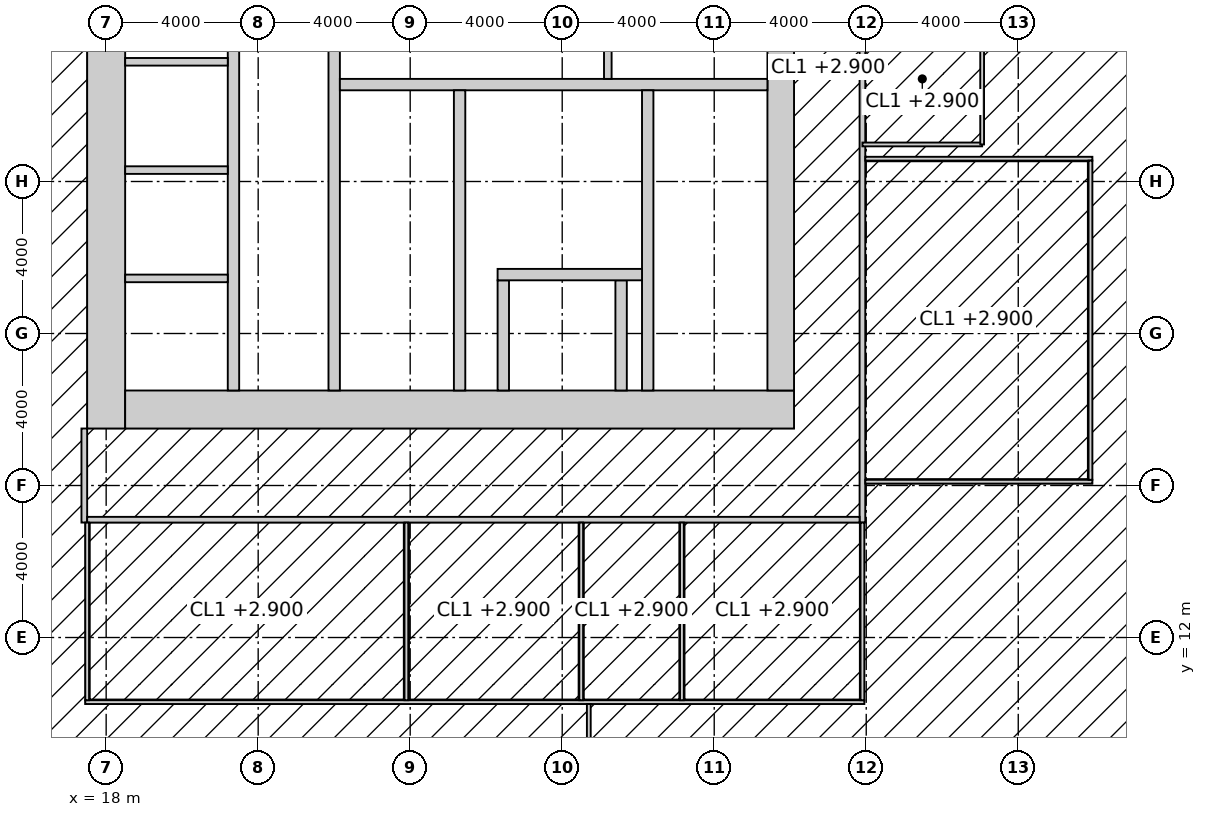
"""IFC4 building model, lengths in metres.
Left out: names, types, materials, properties, quantities, classifications, styles, units other than length and angle.
Written with IfcOpenShell. Run it as: python <this file> out.ifc"""

import sys

from ifc_helpers import new_model, si_unit, direction, frame, frame_2d, origin, place, context, subcontext, project, spatial, rectangle, extrude, element, fill, save


model = new_model("IFC4")
c1 = context("Model", 3, precision=1e-05, world=origin(), true_north=direction((0.0, 1.0)))
c2 = subcontext(c1, "Body", "Model", "MODEL_VIEW")
j1 = project(units=[si_unit("LENGTHUNIT", "METRE"), si_unit("PLANEANGLEUNIT", "RADIAN")], contexts=[c1])
p1 = place(None, origin())
s1 = spatial("IfcSite", under=j1, at=p1, CompositionType="ELEMENT")
p2 = place(p1, origin())
s2 = spatial("IfcBuilding", under=s1, at=p2, CompositionType="ELEMENT")
p3 = place(p2, frame((0.0, 0.0, 113.4)))
s3 = spatial("IfcBuildingStorey", under=s2, at=p3, CompositionType="ELEMENT", Elevation=113.4)
p4 = place(p3, frame((18.0, 17.5, -0.15), z_axis=(0.0, 0.0, 1.0), x_axis=(0.0, 1.0, 0.0)))
e1 = element("IfcWall", 1, at=p4, inside=s3, PredefinedType="SHEAR", context=c2, shape_type="SweptSolid", body=[
    extrude(rectangle(XDim=19.0, YDim=1.0, at=frame_2d((9.5, 0.0))), origin(), (0.0, 0.0, 1.0), 4.0),
])
p5 = place(p3, frame((18.5, 18.0, -0.15), z_axis=(0.0, 0.0, 1.0), x_axis=(1.0, 0.0, 0.0)))
e2 = element("IfcWall", 2, at=p5, inside=s3, PredefinedType="SHEAR", context=c2, shape_type="SweptSolid", body=[
    extrude(rectangle(XDim=17.6, YDim=1.0, at=frame_2d((8.8, 0.0))), origin(), (0.0, 0.0, 1.0), 4.0),
])
p6 = place(p5, frame((3.45, 0.0, 0.15)))
e3 = element("IfcOpeningElement", 3, at=p6, cuts=e2, PredefinedType="OPENING", context=c2, shape_type="SweptSolid", body=[
    extrude(rectangle(XDim=1.5, YDim=2.4, at=frame_2d((0.75, 1.2))), frame((0.0, 0.51, 0.0), z_axis=(0.0, -1.0, 0.0), x_axis=(1.0, 0.0, 0.0)), (0.0, 0.0, 1.0), 1.02),
])
p7 = place(p3, frame((35.75, 18.5, -0.15), z_axis=(0.0, 0.0, 1.0), x_axis=(0.0, 1.0, 0.0)))
e4 = element("IfcWall", 4, at=p7, inside=s3, PredefinedType="SHEAR", context=c2, shape_type="SweptSolid", body=[
    extrude(rectangle(XDim=17.0, YDim=0.7, at=frame_2d((8.5, 0.0))), origin(), (0.0, 0.0, 1.0), 4.0),
])
p8 = place(p7, frame((9.85, 0.0, 0.15)))
e5 = element("IfcOpeningElement", 5, at=p8, cuts=e4, PredefinedType="OPENING", context=c2, shape_type="SweptSolid", body=[
    extrude(rectangle(XDim=1.0, YDim=2.2, at=frame_2d((0.5, 1.1))), frame((0.0, 0.36, 0.0), z_axis=(0.0, -1.0, 0.0), x_axis=(1.0, 0.0, 0.0)), (0.0, 0.0, 1.0), 0.72),
])
p9 = place(p3, frame((24.0, 18.5, -0.15), z_axis=(0.0, 0.0, 1.0), x_axis=(0.0, 1.0, 0.0)))
e6 = element("IfcWall", 6, at=p9, inside=s3, PredefinedType="SHEAR", context=c2, shape_type="SweptSolid", body=[
    extrude(rectangle(XDim=17.0, YDim=0.3, at=frame_2d((8.5, 0.0))), origin(), (0.0, 0.0, 1.0), 4.0),
])
p10 = place(p9, frame((9.6, 0.0, 0.15)))
e7 = element("IfcOpeningElement", 7, at=p10, cuts=e6, PredefinedType="OPENING", context=c2, shape_type="SweptSolid", body=[
    extrude(rectangle(XDim=1.5, YDim=2.4, at=frame_2d((0.75, 1.2))), frame((0.0, 0.16, 0.0), z_axis=(0.0, -1.0, 0.0), x_axis=(1.0, 0.0, 0.0)), (0.0, 0.0, 1.0), 0.32),
])
p11 = place(p3, frame((24.15, 26.55, -0.15), z_axis=(0.0, 0.0, 1.0), x_axis=(1.0, 0.0, 0.0)))
e8 = element("IfcWall", 8, at=p11, inside=s3, PredefinedType="SHEAR", context=c2, shape_type="SweptSolid", body=[
    extrude(rectangle(XDim=11.25, YDim=0.3, at=frame_2d((5.625, 0.0))), origin(), (0.0, 0.0, 1.0), 4.0),
])
p12 = place(p11, frame((9.25, 0.0, 0.15)))
e9 = element("IfcOpeningElement", 9, at=p12, cuts=e8, PredefinedType="OPENING", context=c2, shape_type="SweptSolid", body=[
    extrude(rectangle(XDim=1.0, YDim=2.2, at=frame_2d((0.5, 1.1))), frame((0.0, 0.16, 0.0), z_axis=(0.0, -1.0, 0.0), x_axis=(1.0, 0.0, 0.0)), (0.0, 0.0, 1.0), 0.32),
])
p13 = place(p11, frame((4.9, 0.0, 0.15)))
e10 = element("IfcOpeningElement", 10, at=p13, cuts=e8, PredefinedType="OPENING", context=c2, shape_type="SweptSolid", body=[
    extrude(rectangle(XDim=1.5, YDim=2.4, at=frame_2d((0.75, 1.2))), frame((0.0, 0.16, 0.0), z_axis=(0.0, -1.0, 0.0), x_axis=(1.0, 0.0, 0.0)), (0.0, 0.0, 1.0), 0.32),
])
p14 = place(p3, frame((27.3, 18.5, -0.15), z_axis=(0.0, 0.0, 1.0), x_axis=(0.0, 1.0, 0.0)))
e11 = element("IfcWall", 11, at=p14, inside=s3, PredefinedType="SHEAR", context=c2, shape_type="SweptSolid", body=[
    extrude(rectangle(XDim=7.9, YDim=0.3, at=frame_2d((3.95, 0.0))), origin(), (0.0, 0.0, 1.0), 4.0),
])
p15 = place(p14, frame((6.4, 0.0, 0.15)))
e12 = element("IfcOpeningElement", 12, at=p15, cuts=e11, PredefinedType="OPENING", context=c2, shape_type="SweptSolid", body=[
    extrude(rectangle(XDim=1.0, YDim=2.2, at=frame_2d((0.5, 1.1))), frame((0.0, 0.16, 0.0), z_axis=(0.0, -1.0, 0.0), x_axis=(1.0, 0.0, 0.0)), (0.0, 0.0, 1.0), 0.32),
])
p16 = place(p3, frame((32.25, 18.5, -0.15), z_axis=(0.0, 0.0, 1.0), x_axis=(0.0, 1.0, 0.0)))
e13 = element("IfcWall", 13, at=p16, inside=s3, PredefinedType="SHEAR", context=c2, shape_type="SweptSolid", body=[
    extrude(rectangle(XDim=7.9, YDim=0.3, at=frame_2d((3.95, 0.0))), origin(), (0.0, 0.0, 1.0), 4.0),
])
for number, where, z_axis, x_axis in (
    (14, (28.45, 18.5, -0.15), (0.0, 0.0, 1.0), (0.0, 1.0, 0.0)),
    (15, (31.55, 18.5, -0.15), (0.0, 0.0, 1.0), (0.0, 1.0, 0.0)),
):
    element("IfcWall", number, at=place(p3, frame(where, z_axis=z_axis, x_axis=x_axis)), inside=s3, PredefinedType="SHEAR", context=c2, shape_type="SweptSolid", body=[
        extrude(rectangle(XDim=2.9, YDim=0.3, at=frame_2d((1.45, 0.0))), origin(), (0.0, 0.0, 1.0), 4.0),
    ])
p17 = place(p3, frame((28.3, 21.55, -0.15), z_axis=(0.0, 0.0, 1.0), x_axis=(1.0, 0.0, 0.0)))
e16 = element("IfcWall", 16, at=p17, inside=s3, PredefinedType="SHEAR", context=c2, shape_type="SweptSolid", body=[
    extrude(rectangle(XDim=3.8, YDim=0.3, at=frame_2d((1.9, 0.0))), origin(), (0.0, 0.0, 1.0), 4.0),
])
p18 = place(p17, frame((1.05, 0.0, 0.15)))
e17 = element("IfcOpeningElement", 17, at=p18, cuts=e16, PredefinedType="OPENING", context=c2, shape_type="SweptSolid", body=[
    extrude(rectangle(XDim=1.3, YDim=2.4, at=frame_2d((0.65, 1.2))), frame((0.0, 0.16, 0.0), z_axis=(0.0, -1.0, 0.0), x_axis=(1.0, 0.0, 0.0)), (0.0, 0.0, 1.0), 0.32),
])
p19 = place(p3, frame((21.35, 18.5, -0.15), z_axis=(0.0, 0.0, 1.0), x_axis=(0.0, 1.0, 0.0)))
e18 = element("IfcWall", 18, at=p19, inside=s3, PredefinedType="SHEAR", context=c2, shape_type="SweptSolid", body=[
    extrude(rectangle(XDim=12.5, YDim=0.3, at=frame_2d((6.25, 0.0))), origin(), (0.0, 0.0, 1.0), 4.0),
])
p20 = place(p19, frame((0.875, 0.0, 0.15)))
e19 = element("IfcOpeningElement", 19, at=p20, cuts=e18, PredefinedType="OPENING", context=c2, shape_type="SweptSolid", body=[
    extrude(rectangle(XDim=1.1, YDim=2.2, at=frame_2d((0.55, 1.1))), frame((0.0, 0.16, 0.0), z_axis=(0.0, -1.0, 0.0), x_axis=(1.0, 0.0, 0.0)), (0.0, 0.0, 1.0), 0.32),
])
p21 = place(p19, frame((3.825, 0.0, 0.15)))
e20 = element("IfcOpeningElement", 20, at=p21, cuts=e18, PredefinedType="OPENING", context=c2, shape_type="SweptSolid", body=[
    extrude(rectangle(XDim=1.1, YDim=2.2, at=frame_2d((0.55, 1.1))), frame((0.0, 0.16, 0.0), z_axis=(0.0, -1.0, 0.0), x_axis=(1.0, 0.0, 0.0)), (0.0, 0.0, 1.0), 0.32),
])
p22 = place(p19, frame((6.675, 0.0, 0.15)))
e21 = element("IfcOpeningElement", 21, at=p22, cuts=e18, PredefinedType="OPENING", context=c2, shape_type="SweptSolid", body=[
    extrude(rectangle(XDim=1.1, YDim=2.2, at=frame_2d((0.55, 1.1))), frame((0.0, 0.16, 0.0), z_axis=(0.0, -1.0, 0.0), x_axis=(1.0, 0.0, 0.0)), (0.0, 0.0, 1.0), 0.32),
])
p23 = place(p19, frame((9.575, 0.0, 0.15)))
e22 = element("IfcOpeningElement", 22, at=p23, cuts=e18, PredefinedType="OPENING", context=c2, shape_type="SweptSolid", body=[
    extrude(rectangle(XDim=1.1, YDim=2.2, at=frame_2d((0.55, 1.1))), frame((0.0, 0.16, 0.0), z_axis=(0.0, -1.0, 0.0), x_axis=(1.0, 0.0, 0.0)), (0.0, 0.0, 1.0), 0.32),
])
for number, where, z_axis, x_axis in (
    (23, (18.5, 21.45, -0.15), (0.0, 0.0, 1.0), (1.0, 0.0, 0.0)),
    (24, (18.5, 24.3, -0.15), (0.0, 0.0, 1.0), (1.0, 0.0, 0.0)),
    (25, (18.5, 27.15, -0.15), (0.0, 0.0, 1.0), (1.0, 0.0, 0.0)),
):
    element("IfcWall", number, at=place(p3, frame(where, z_axis=z_axis, x_axis=x_axis)), inside=s3, PredefinedType="SOLIDWALL", context=c2, shape_type="SweptSolid", body=[
        extrude(rectangle(XDim=2.7, YDim=0.2, at=frame_2d((1.35, 0.0))), origin(), (0.0, 0.0, 1.0), 4.0),
    ])
p24 = place(p3, frame((31.2, 26.7, 0.0), z_axis=(0.0, 0.0, 1.0), x_axis=(0.0, 1.0, 0.0)))
e26 = element("IfcWall", 26, at=p24, inside=s3, PredefinedType="SOLIDWALL", context=c2, shape_type="SweptSolid", body=[
    extrude(rectangle(XDim=4.3, YDim=0.2, at=frame_2d((2.15, 0.0))), origin(), (0.0, 0.0, 1.0), 3.85),
])
p25 = place(p3, frame((17.425, 15.025, 0.0), z_axis=(0.0, 0.0, 1.0), x_axis=(0.0, 1.0, 0.0)))
e27 = element("IfcWall", 27, at=p25, inside=s3, PredefinedType="PARTITIONING", context=c2, shape_type="SweptSolid", body=[
    extrude(rectangle(XDim=2.475, YDim=0.15, at=frame_2d((1.238, 0.0))), origin(), (0.0, 0.0, 1.0), 3.85),
])
p26 = place(p3, frame((37.9, 15.025, 0.0), z_axis=(0.0, 0.0, 1.0), x_axis=(0.0, 1.0, 0.0)))
e28 = element("IfcWall", 28, at=p26, inside=s3, PredefinedType="PARTITIONING", context=c2, shape_type="SweptSolid", body=[
    extrude(rectangle(XDim=23.35, YDim=0.15, at=frame_2d((11.675, 0.0))), origin(), (0.0, 0.0, 1.0), 2.95),
])
p27 = place(p26, frame((10.775, 0.0, 0.0)))
e29 = element("IfcOpeningElement", 29, at=p27, cuts=e28, PredefinedType="OPENING", context=c2, shape_type="SweptSolid", body=[
    extrude(rectangle(XDim=1.8, YDim=2.4, at=frame_2d((0.9, 1.2))), frame((0.0, 0.085, 0.0), z_axis=(0.0, -1.0, 0.0), x_axis=(1.0, 0.0, 0.0)), (0.0, 0.0, 1.0), 0.17),
])
p28 = place(p3, frame((17.5, 15.1, 0.0), z_axis=(0.0, 0.0, 1.0), x_axis=(1.0, 0.0, 0.0)))
e30 = element("IfcWall", 30, at=p28, inside=s3, PredefinedType="PARTITIONING", context=c2, shape_type="SweptSolid", body=[
    extrude(rectangle(XDim=20.325, YDim=0.15, at=frame_2d((10.163, 0.0))), origin(), (0.0, 0.0, 1.0), 3.85),
])
p29 = place(p3, frame((17.45, 10.3, 0.0), z_axis=(0.0, 0.0, 1.0), x_axis=(1.0, 0.0, 0.0)))
e31 = element("IfcWall", 31, at=p29, inside=s3, PredefinedType="PARTITIONING", context=c2, shape_type="SweptSolid", body=[
    extrude(rectangle(XDim=20.5, YDim=0.1, at=frame_2d((10.25, 0.0))), origin(), (0.0, 0.0, 1.0), 3.85),
])
p30 = place(p29, frame((3.35, 0.0, 0.0)))
e32 = element("IfcOpeningElement", 32, at=p30, cuts=e31, PredefinedType="OPENING", context=c2, shape_type="SweptSolid", body=[
    extrude(rectangle(XDim=1.8, YDim=2.4, at=frame_2d((0.9, 1.2))), frame((0.0, 0.06, 0.0), z_axis=(0.0, -1.0, 0.0), x_axis=(1.0, 0.0, 0.0)), (0.0, 0.0, 1.0), 0.12),
])
p31 = place(p29, frame((10.25, 0.0, 0.0)))
e33 = element("IfcOpeningElement", 33, at=p31, cuts=e31, PredefinedType="OPENING", context=c2, shape_type="SweptSolid", body=[
    extrude(rectangle(XDim=1.0, YDim=2.2, at=frame_2d((0.5, 1.1))), frame((0.0, 0.06, 0.0), z_axis=(0.0, -1.0, 0.0), x_axis=(1.0, 0.0, 0.0)), (0.0, 0.0, 1.0), 0.12),
])
p32 = place(p29, frame((13.875, 0.0, 0.0)))
e34 = element("IfcOpeningElement", 34, at=p32, cuts=e31, PredefinedType="OPENING", context=c2, shape_type="SweptSolid", body=[
    extrude(rectangle(XDim=1.0, YDim=2.2, at=frame_2d((0.5, 1.1))), frame((0.0, 0.06, 0.0), z_axis=(0.0, -1.0, 0.0), x_axis=(1.0, 0.0, 0.0)), (0.0, 0.0, 1.0), 0.12),
])
p33 = place(p29, frame((17.575, 0.0, 0.0)))
e35 = element("IfcOpeningElement", 35, at=p33, cuts=e31, PredefinedType="OPENING", context=c2, shape_type="SweptSolid", body=[
    extrude(rectangle(XDim=1.0, YDim=2.2, at=frame_2d((0.5, 1.1))), frame((0.0, 0.06, 0.0), z_axis=(0.0, -1.0, 0.0), x_axis=(1.0, 0.0, 0.0)), (0.0, 0.0, 1.0), 0.12),
])
for number, where, z_axis, x_axis in (
    (36, (37.975, 16.1, 0.0), (0.0, 0.0, 1.0), (1.0, 0.0, 0.0)),
    (37, (37.975, 24.6, 0.0), (0.0, 0.0, 1.0), (1.0, 0.0, 0.0)),
):
    element("IfcWall", number, at=place(p3, frame(where, z_axis=z_axis, x_axis=x_axis)), inside=s3, PredefinedType="PARTITIONING", context=c2, shape_type="SweptSolid", body=[
        extrude(rectangle(XDim=5.975, YDim=0.1, at=frame_2d((2.987, 0.0))), origin(), (0.0, 0.0, 1.0), 3.85),
    ])
p34 = place(p3, frame((17.5, 10.35, 0.0), z_axis=(0.0, 0.0, 1.0), x_axis=(0.0, 1.0, 0.0)))
e38 = element("IfcWall", 38, at=p34, inside=s3, PredefinedType="PARTITIONING", context=c2, shape_type="SweptSolid", body=[
    extrude(rectangle(XDim=4.675, YDim=0.1, at=frame_2d((2.337, 0.0))), origin(), (0.0, 0.0, 1.0), 3.85),
])
p35 = place(p3, frame((25.9, 10.35, 0.0), z_axis=(0.0, 0.0, 1.0), x_axis=(0.0, 1.0, 0.0)))
e39 = element("IfcWall", 39, at=p35, inside=s3, PredefinedType="PARTITIONING", context=c2, shape_type="SweptSolid", body=[
    extrude(rectangle(XDim=4.675, YDim=0.1, at=frame_2d((2.337, 0.0))), origin(), (0.0, 0.0, 1.0), 2.95),
])
for number, where, z_axis, x_axis in (
    (40, (30.5, 10.35, 0.0), (0.0, 0.0, 1.0), (0.0, 1.0, 0.0)),
    (41, (33.15, 10.35, 0.0), (0.0, 0.0, 1.0), (0.0, 1.0, 0.0)),
):
    element("IfcWall", number, at=place(p3, frame(where, z_axis=z_axis, x_axis=x_axis)), inside=s3, PredefinedType="PARTITIONING", context=c2, shape_type="SweptSolid", body=[
        extrude(rectangle(XDim=4.675, YDim=0.1, at=frame_2d((2.337, 0.0))), origin(), (0.0, 0.0, 1.0), 3.85),
    ])
p36 = place(p3, frame((37.9, 10.35, 0.0), z_axis=(0.0, 0.0, 1.0), x_axis=(0.0, 1.0, 0.0)))
e42 = element("IfcWall", 42, at=p36, inside=s3, PredefinedType="PARTITIONING", context=c2, shape_type="SweptSolid", body=[
    extrude(rectangle(XDim=4.675, YDim=0.1, at=frame_2d((2.337, 0.0))), origin(), (0.0, 0.0, 1.0), 2.95),
])
p37 = place(p3, frame((43.9, 16.15, 0.0), z_axis=(0.0, 0.0, 1.0), x_axis=(0.0, 1.0, 0.0)))
e43 = element("IfcWall", 43, at=p37, inside=s3, PredefinedType="PARTITIONING", context=c2, shape_type="SweptSolid", body=[
    extrude(rectangle(XDim=8.4, YDim=0.1, at=frame_2d((4.2, 0.0))), origin(), (0.0, 0.0, 1.0), 3.85),
])
p38 = place(p37, frame((3.3, 0.0, 0.0)))
e44 = element("IfcOpeningElement", 44, at=p38, cuts=e43, PredefinedType="OPENING", context=c2, shape_type="SweptSolid", body=[
    extrude(rectangle(XDim=1.8, YDim=2.4, at=frame_2d((0.9, 1.2))), frame((0.0, 0.06, 0.0), z_axis=(0.0, -1.0, 0.0), x_axis=(1.0, 0.0, 0.0)), (0.0, 0.0, 1.0), 0.12),
])
p39 = place(p3, frame((30.7, 4.3, 0.0), z_axis=(0.0, 0.0, 1.0), x_axis=(0.0, 1.0, 0.0)))
e45 = element("IfcWall", 45, at=p39, inside=s3, PredefinedType="PARTITIONING", context=c2, shape_type="SweptSolid", body=[
    extrude(rectangle(XDim=5.95, YDim=0.1, at=frame_2d((2.975, 0.0))), origin(), (0.0, 0.0, 1.0), 3.85),
])
p40 = place(p3, frame((37.9, 24.975, 0.0), z_axis=(0.0, 0.0, 1.0), x_axis=(1.0, 0.0, 0.0)))
e46 = element("IfcWall", 46, at=p40, inside=s3, PredefinedType="PARTITIONING", context=c2, shape_type="SweptSolid", body=[
    extrude(rectangle(XDim=3.15, YDim=0.1, at=frame_2d((1.575, 0.0))), origin(), (0.0, 0.0, 1.0), 3.85),
])
p41 = place(p3, frame((41.05, 24.975, 0.0), z_axis=(0.0, 0.0, 1.0), x_axis=(0.0, 1.0, 0.0)))
e47 = element("IfcWall", 47, at=p41, inside=s3, PredefinedType="PARTITIONING", context=c2, shape_type="SweptSolid", body=[
    extrude(rectangle(XDim=3.45, YDim=0.1, at=frame_2d((1.725, 0.0))), origin(), (0.0, 0.0, 1.0), 3.85),
])
p42 = place(p41, frame((1.225, 0.0, 0.0)))
e48 = element("IfcOpeningElement", 48, at=p42, cuts=e47, PredefinedType="OPENING", context=c2, shape_type="SweptSolid", body=[
    extrude(rectangle(XDim=1.0, YDim=2.2, at=frame_2d((0.5, 1.1))), frame((0.0, 0.06, 0.0), z_axis=(0.0, -1.0, 0.0), x_axis=(1.0, 0.0, 0.0)), (0.0, 0.0, 1.0), 0.12),
])
p43 = place(p15, origin())
e49 = element("IfcDoor", 49, at=p43, inside=s3, OperationType="SINGLE_SWING_RIGHT", PredefinedType="DOOR", context=c2, shape_type="SweptSolid", body=[
    extrude(rectangle(XDim=1.0, YDim=2.2, at=frame_2d((0.5, 1.1))), frame((0.0, 0.025, 0.0), z_axis=(0.0, -1.0, 0.0), x_axis=(1.0, 0.0, 0.0)), (0.0, 0.0, 1.0), 0.05),
])
fill(e12, e49)
p44 = place(p12, frame((1.0, 0.0, 0.0), z_axis=(0.0, 0.0, 1.0), x_axis=(-1.0, 0.0, 0.0)))
e50 = element("IfcDoor", 50, at=p44, inside=s3, OperationType="SINGLE_SWING_RIGHT", PredefinedType="DOOR", context=c2, shape_type="SweptSolid", body=[
    extrude(rectangle(XDim=1.0, YDim=2.2, at=frame_2d((0.5, 1.1))), frame((0.0, 0.025, 0.0), z_axis=(0.0, -1.0, 0.0), x_axis=(1.0, 0.0, 0.0)), (0.0, 0.0, 1.0), 0.05),
])
fill(e9, e50)
p45 = place(p13, origin())
e51 = element("IfcDoor", 51, at=p45, inside=s3, OperationType="DOUBLE_DOOR_DOUBLE_SWING", PredefinedType="DOOR", context=c2, shape_type="SweptSolid", body=[
    extrude(rectangle(XDim=1.5, YDim=2.4, at=frame_2d((0.75, 1.2))), frame((0.0, 0.025, 0.0), z_axis=(0.0, -1.0, 0.0), x_axis=(1.0, 0.0, 0.0)), (0.0, 0.0, 1.0), 0.05),
])
fill(e10, e51)
p46 = place(p6, origin())
e52 = element("IfcDoor", 52, at=p46, inside=s3, OperationType="DOUBLE_DOOR_DOUBLE_SWING", PredefinedType="DOOR", context=c2, shape_type="SweptSolid", body=[
    extrude(rectangle(XDim=1.5, YDim=2.4, at=frame_2d((0.75, 1.2))), frame((0.0, 0.025, 0.0), z_axis=(0.0, -1.0, 0.0), x_axis=(1.0, 0.0, 0.0)), (0.0, 0.0, 1.0), 0.05),
])
fill(e3, e52)
p47 = place(p27, origin())
e53 = element("IfcDoor", 53, at=p47, inside=s3, OperationType="DOUBLE_DOOR_DOUBLE_SWING", PredefinedType="DOOR", context=c2, shape_type="SweptSolid", body=[
    extrude(rectangle(XDim=1.8, YDim=2.4, at=frame_2d((0.9, 1.2))), frame((0.0, 0.025, 0.0), z_axis=(0.0, -1.0, 0.0), x_axis=(1.0, 0.0, 0.0)), (0.0, 0.0, 1.0), 0.05),
])
fill(e29, e53)
p48 = place(p30, origin())
e54 = element("IfcDoor", 54, at=p48, inside=s3, OperationType="DOUBLE_DOOR_DOUBLE_SWING", PredefinedType="DOOR", context=c2, shape_type="SweptSolid", body=[
    extrude(rectangle(XDim=1.8, YDim=2.4, at=frame_2d((0.9, 1.2))), frame((0.0, 0.025, 0.0), z_axis=(0.0, -1.0, 0.0), x_axis=(1.0, 0.0, 0.0)), (0.0, 0.0, 1.0), 0.05),
])
fill(e32, e54)
p49 = place(p31, origin())
e55 = element("IfcDoor", 55, at=p49, inside=s3, OperationType="SINGLE_SWING_LEFT", PredefinedType="DOOR", context=c2, shape_type="SweptSolid", body=[
    extrude(rectangle(XDim=1.0, YDim=2.2, at=frame_2d((0.5, 1.1))), frame((0.0, 0.025, 0.0), z_axis=(0.0, -1.0, 0.0), x_axis=(1.0, 0.0, 0.0)), (0.0, 0.0, 1.0), 0.05),
])
fill(e33, e55)
p50 = place(p32, origin())
e56 = element("IfcDoor", 56, at=p50, inside=s3, OperationType="SINGLE_SWING_LEFT", PredefinedType="DOOR", context=c2, shape_type="SweptSolid", body=[
    extrude(rectangle(XDim=1.0, YDim=2.2, at=frame_2d((0.5, 1.1))), frame((0.0, 0.025, 0.0), z_axis=(0.0, -1.0, 0.0), x_axis=(1.0, 0.0, 0.0)), (0.0, 0.0, 1.0), 0.05),
])
fill(e34, e56)
p51 = place(p33, origin())
e57 = element("IfcDoor", 57, at=p51, inside=s3, OperationType="SINGLE_SWING_LEFT", PredefinedType="DOOR", context=c2, shape_type="SweptSolid", body=[
    extrude(rectangle(XDim=1.0, YDim=2.2, at=frame_2d((0.5, 1.1))), frame((0.0, 0.025, 0.0), z_axis=(0.0, -1.0, 0.0), x_axis=(1.0, 0.0, 0.0)), (0.0, 0.0, 1.0), 0.05),
])
fill(e35, e57)
p52 = place(p38, origin())
e58 = element("IfcDoor", 58, at=p52, inside=s3, OperationType="DOUBLE_DOOR_DOUBLE_SWING", PredefinedType="DOOR", context=c2, shape_type="SweptSolid", body=[
    extrude(rectangle(XDim=1.8, YDim=2.4, at=frame_2d((0.9, 1.2))), frame((0.0, 0.025, 0.0), z_axis=(0.0, -1.0, 0.0), x_axis=(1.0, 0.0, 0.0)), (0.0, 0.0, 1.0), 0.05),
])
fill(e44, e58)
p53 = place(p42, origin())
e59 = element("IfcDoor", 59, at=p53, inside=s3, OperationType="SINGLE_SWING_RIGHT", PredefinedType="DOOR", context=c2, shape_type="SweptSolid", body=[
    extrude(rectangle(XDim=1.0, YDim=2.2, at=frame_2d((0.5, 1.1))), frame((0.0, 0.025, 0.0), z_axis=(0.0, -1.0, 0.0), x_axis=(1.0, 0.0, 0.0)), (0.0, 0.0, 1.0), 0.05),
])
fill(e48, e59)
p54 = place(p18, origin())
e60 = element("IfcDoor", 60, at=p54, inside=s3, OperationType="DOUBLE_DOOR_SLIDING", PredefinedType="DOOR", context=c2, shape_type="SweptSolid", body=[
    extrude(rectangle(XDim=1.3, YDim=2.4, at=frame_2d((0.65, 1.2))), frame((0.0, 0.025, 0.0), z_axis=(0.0, -1.0, 0.0), x_axis=(1.0, 0.0, 0.0)), (0.0, 0.0, 1.0), 0.05),
])
fill(e17, e60)
p55 = place(p20, origin())
e61 = element("IfcDoor", 61, at=p55, inside=s3, OperationType="DOUBLE_DOOR_SLIDING", PredefinedType="DOOR", context=c2, shape_type="SweptSolid", body=[
    extrude(rectangle(XDim=1.1, YDim=2.2, at=frame_2d((0.55, 1.1))), frame((0.0, 0.025, 0.0), z_axis=(0.0, -1.0, 0.0), x_axis=(1.0, 0.0, 0.0)), (0.0, 0.0, 1.0), 0.05),
])
fill(e19, e61)
p56 = place(p21, origin())
e62 = element("IfcDoor", 62, at=p56, inside=s3, OperationType="DOUBLE_DOOR_SLIDING", PredefinedType="DOOR", context=c2, shape_type="SweptSolid", body=[
    extrude(rectangle(XDim=1.1, YDim=2.2, at=frame_2d((0.55, 1.1))), frame((0.0, 0.025, 0.0), z_axis=(0.0, -1.0, 0.0), x_axis=(1.0, 0.0, 0.0)), (0.0, 0.0, 1.0), 0.05),
])
fill(e20, e62)
p57 = place(p22, origin())
e63 = element("IfcDoor", 63, at=p57, inside=s3, OperationType="DOUBLE_DOOR_SLIDING", PredefinedType="DOOR", context=c2, shape_type="SweptSolid", body=[
    extrude(rectangle(XDim=1.1, YDim=2.2, at=frame_2d((0.55, 1.1))), frame((0.0, 0.025, 0.0), z_axis=(0.0, -1.0, 0.0), x_axis=(1.0, 0.0, 0.0)), (0.0, 0.0, 1.0), 0.05),
])
fill(e21, e63)
save(model, sys.argv[1])
